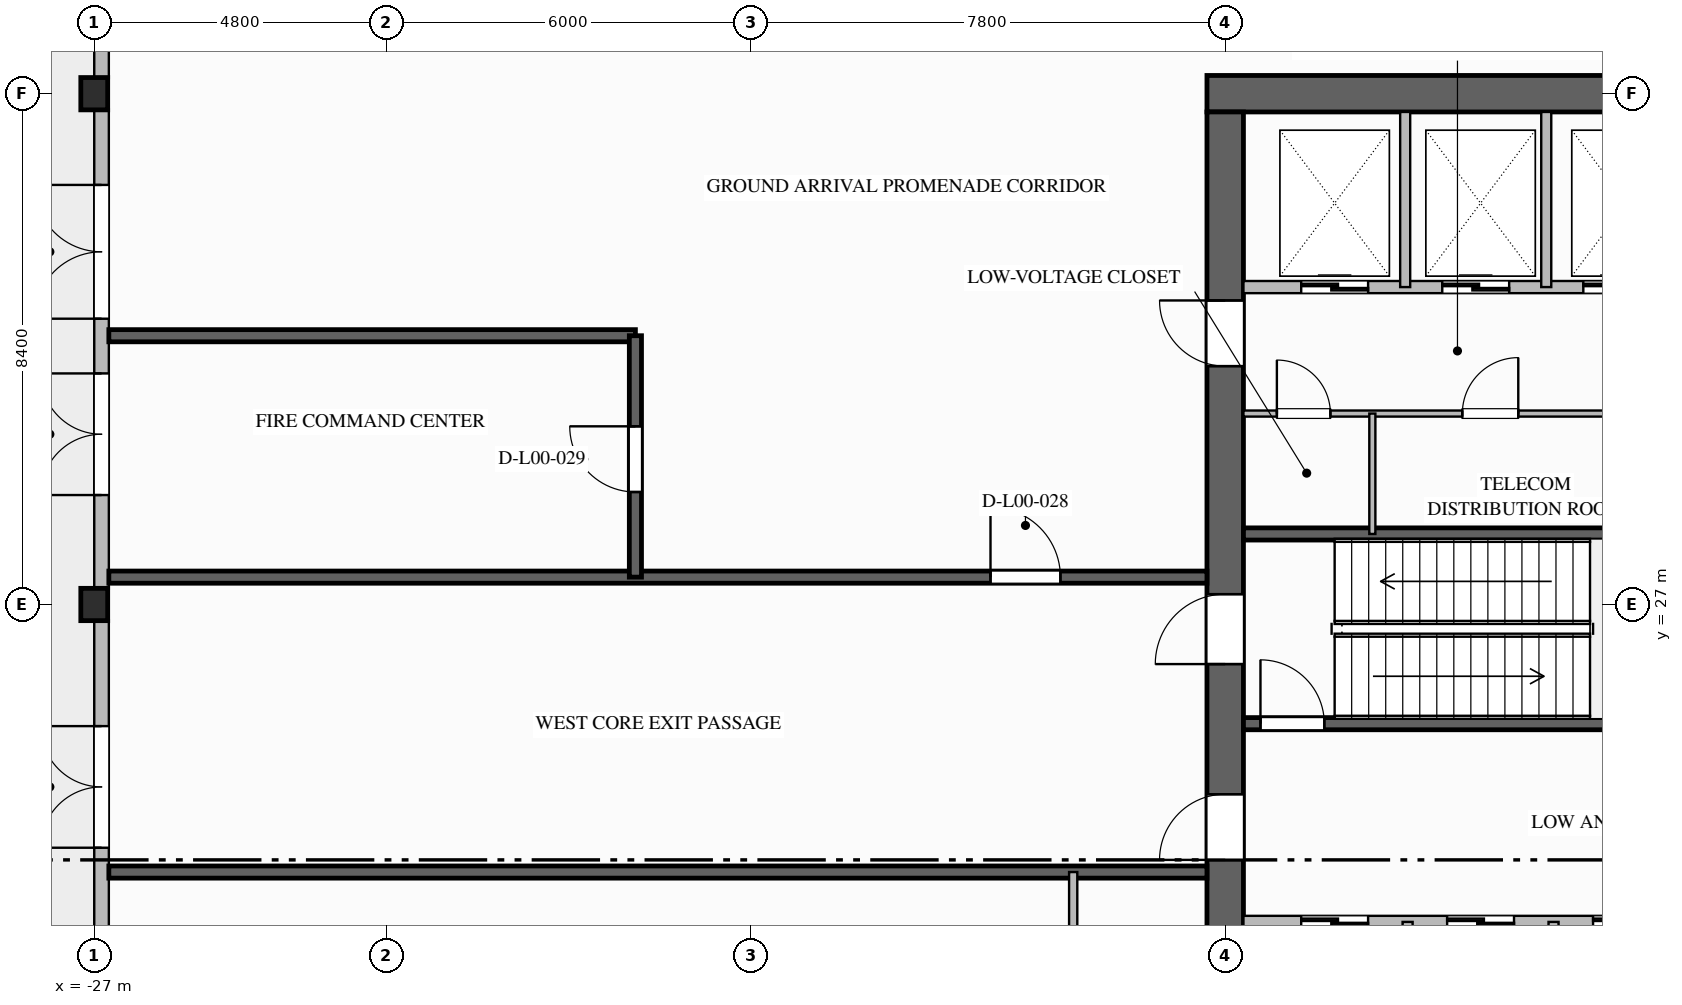
"""IFC4 building model, lengths in metres.
Left out: names, types, materials, properties, quantities, classifications, styles, units other than length and angle.
Written with IfcOpenShell. Run it as: python <this file> out.ifc"""

import sys

from ifc_helpers import new_model, si_unit, direction, frame, frame_2d, origin, origin_2d, place, context, subcontext, project, spatial, rectangle, i_section, extrude, element, fill, save


model = new_model("IFC4")
c1 = context("Model", 3, precision=1e-05, world=origin(), true_north=direction((0.0, 1.0)))
c2 = subcontext(c1, "Body", "Model", "MODEL_VIEW")
j1 = project(units=[si_unit("LENGTHUNIT", "METRE"), si_unit("PLANEANGLEUNIT", "RADIAN")], contexts=[c1])
p1 = place(None, origin())
s1 = spatial("IfcSite", under=j1, at=p1, CompositionType="ELEMENT")
p2 = place(p1, origin())
s2 = spatial("IfcBuilding", under=s1, at=p2, CompositionType="ELEMENT")
p3 = place(p2, origin())
s3 = spatial("IfcBuildingStorey", under=s2, at=p3, CompositionType="ELEMENT", Elevation=0.0)
p4 = place(p3, frame((-8.7, 35.4, 0.0), z_axis=(0.0, 0.0, 1.0), x_axis=(1.0, 0.0, 0.0)))
e1 = element("IfcWall", 1, at=p4, inside=s3, PredefinedType="SHEAR", context=c2, shape_type="SweptSolid", body=[
    extrude(rectangle(XDim=17.4, YDim=0.6, at=frame_2d((8.7, 0.0))), origin(), (0.0, 0.0, 1.0), 5.6),
])
p5 = place(p3, frame((-8.4, 18.9, 0.0), z_axis=(0.0, 0.0, 1.0), x_axis=(0.0, 1.0, 0.0)))
e2 = element("IfcWall", 2, at=p5, inside=s3, PredefinedType="SHEAR", context=c2, shape_type="SweptSolid", body=[
    extrude(rectangle(XDim=16.2, YDim=0.6, at=frame_2d((8.1, 0.0))), origin(), (0.0, 0.0, 1.0), 5.6),
])
p6 = place(p5, frame((7.12, 0.0, 0.0)))
e3 = element("IfcOpeningElement", 3, at=p6, cuts=e2, PredefinedType="OPENING", context=c2, shape_type="SweptSolid", body=[
    extrude(rectangle(XDim=1.15, YDim=2.15, at=frame_2d((0.575, 1.075))), frame((0.0, 0.31, 0.0), z_axis=(0.0, -1.0, 0.0), x_axis=(1.0, 0.0, 0.0)), (0.0, 0.0, 1.0), 0.62),
])
p7 = place(p5, frame((12.02, 0.0, 0.0)))
e4 = element("IfcOpeningElement", 4, at=p7, cuts=e2, PredefinedType="OPENING", context=c2, shape_type="SweptSolid", body=[
    extrude(rectangle(XDim=1.08, YDim=2.04, at=frame_2d((0.54, 1.02))), frame((0.0, 0.31, 0.0), z_axis=(0.0, -1.0, 0.0), x_axis=(1.0, 0.0, 0.0)), (0.0, 0.0, 1.0), 0.62),
])
p8 = place(p5, frame((3.9, 0.0, 0.0)))
e5 = element("IfcOpeningElement", 5, at=p8, cuts=e2, PredefinedType="OPENING", context=c2, shape_type="SweptSolid", body=[
    extrude(rectangle(XDim=1.08, YDim=2.04, at=frame_2d((0.54, 1.02))), frame((0.0, 0.31, 0.0), z_axis=(0.0, -1.0, 0.0), x_axis=(1.0, 0.0, 0.0)), (0.0, 0.0, 1.0), 0.62),
])
for number, where, z_axis, x_axis in (
    (6, (-27.0, 27.0, 0.0), (0.0, 0.0, 1.0), (1.0, 0.0, 0.0)),
    (7, (-27.0, 35.4, 0.0), (0.0, 0.0, 1.0), (1.0, 0.0, 0.0)),
):
    element("IfcColumn", number, at=place(p3, frame(where, z_axis=z_axis, x_axis=x_axis)), inside=s3, PredefinedType="COLUMN", context=c2, shape_type="SweptSolid", body=[
        extrude(i_section(OverallWidth=0.442, OverallDepth=0.531, WebThickness=0.066, FlangeThickness=0.106, FilletRadius=0.03, at=origin_2d()), origin(), (0.0, 0.0, 1.0), 5.6),
    ])
p9 = place(p3, frame((-26.88, 18.858, 0.0), z_axis=(0.0, 0.0, 1.0), x_axis=(0.0, 1.0, 0.0)))
e8 = element("IfcWall", 8, at=p9, inside=s3, PredefinedType="STANDARD", context=c2, shape_type="SweptSolid", body=[
    extrude(rectangle(XDim=7.885, YDim=0.24, at=frame_2d((3.942, 0.0))), origin(), (0.0, 0.0, 1.0), 4.604),
])
p10 = place(p9, frame((4.142, 0.0, 0.0)))
e9 = element("IfcOpeningElement", 9, at=p10, cuts=e8, PredefinedType="OPENING", context=c2, shape_type="SweptSolid", body=[
    extrude(rectangle(XDim=2.0, YDim=2.4, at=frame_2d((1.0, 1.2))), frame((0.0, 0.13, 0.0), z_axis=(0.0, -1.0, 0.0), x_axis=(1.0, 0.0, 0.0)), (0.0, 0.0, 1.0), 0.26),
])
p11 = place(p3, frame((-26.88, 27.258, 0.0), z_axis=(0.0, 0.0, 1.0), x_axis=(0.0, 1.0, 0.0)))
e10 = element("IfcWall", 10, at=p11, inside=s3, PredefinedType="STANDARD", context=c2, shape_type="SweptSolid", body=[
    extrude(rectangle(XDim=7.885, YDim=0.24, at=frame_2d((3.942, 0.0))), origin(), (0.0, 0.0, 1.0), 4.604),
])
p12 = place(p11, frame((1.542, 0.0, 0.0)))
e11 = element("IfcOpeningElement", 11, at=p12, cuts=e10, PredefinedType="OPENING", context=c2, shape_type="SweptSolid", body=[
    extrude(rectangle(XDim=2.0, YDim=2.4, at=frame_2d((1.0, 1.2))), frame((0.0, 0.13, 0.0), z_axis=(0.0, -1.0, 0.0), x_axis=(1.0, 0.0, 0.0)), (0.0, 0.0, 1.0), 0.26),
])
p13 = place(p11, frame((4.442, 0.0, 0.0)))
e12 = element("IfcOpeningElement", 12, at=p13, cuts=e10, PredefinedType="OPENING", context=c2, shape_type="SweptSolid", body=[
    extrude(rectangle(XDim=2.2, YDim=2.6, at=frame_2d((1.1, 1.3))), frame((0.0, 0.13, 0.0), z_axis=(0.0, -1.0, 0.0), x_axis=(1.0, 0.0, 0.0)), (0.0, 0.0, 1.0), 0.26),
])
p14 = place(p3, frame((-26.88, 35.658, 0.0), z_axis=(0.0, 0.0, 1.0), x_axis=(0.0, 1.0, 0.0)))
e13 = element("IfcWall", 13, at=p14, inside=s3, PredefinedType="STANDARD", context=c2, shape_type="SweptSolid", body=[
    extrude(rectangle(XDim=7.285, YDim=0.24, at=frame_2d((3.642, 0.0))), origin(), (0.0, 0.0, 1.0), 4.604),
])
p15 = place(p14, frame((2.442, 0.0, 0.9)))
e14 = element("IfcOpeningElement", 14, at=p15, cuts=e13, PredefinedType="OPENING", context=c2, shape_type="SweptSolid", body=[
    extrude(rectangle(XDim=2.4, YDim=2.6, at=frame_2d((1.2, 1.3))), frame((0.0, 0.13, 0.0), z_axis=(0.0, -1.0, 0.0), x_axis=(1.0, 0.0, 0.0)), (0.0, 0.0, 1.0), 0.26),
])
p16 = place(p3, frame((-8.1, 25.04, 0.0), z_axis=(0.0, 0.0, 1.0), x_axis=(1.0, 0.0, 0.0)))
e15 = element("IfcWall", 15, at=p16, inside=s3, PredefinedType="SOLIDWALL", context=c2, shape_type="SweptSolid", body=[
    extrude(rectangle(XDim=8.1, YDim=0.2, at=frame_2d((4.05, 0.0))), origin(), (0.0, 0.0, 1.0), 5.3),
])
p17 = place(p16, frame((0.28, 0.0, 0.0)))
e16 = element("IfcOpeningElement", 16, at=p17, cuts=e15, PredefinedType="OPENING", context=c2, shape_type="SweptSolid", body=[
    extrude(rectangle(XDim=1.05, YDim=2.1, at=frame_2d((0.525, 1.05))), frame((0.0, 0.11, 0.0), z_axis=(0.0, -1.0, 0.0), x_axis=(1.0, 0.0, 0.0)), (0.0, 0.0, 1.0), 0.22),
])
p18 = place(p3, frame((-8.1, 28.16, 0.0), z_axis=(0.0, 0.0, 1.0), x_axis=(1.0, 0.0, 0.0)))
e17 = element("IfcWall", 17, at=p18, inside=s3, PredefinedType="SOLIDWALL", context=c2, shape_type="SweptSolid", body=[
    extrude(rectangle(XDim=8.1, YDim=0.2, at=frame_2d((4.05, 0.0))), origin(), (0.0, 0.0, 1.0), 5.3),
])
p19 = place(p3, frame((-8.1, 32.22, 0.0), z_axis=(0.0, 0.0, 1.0), x_axis=(1.0, 0.0, 0.0)))
e18 = element("IfcWall", 18, at=p19, inside=s3, PredefinedType="SOLIDWALL", context=c2, shape_type="SweptSolid", body=[
    extrude(rectangle(XDim=7.1, YDim=0.2, at=frame_2d((3.55, 0.0))), origin(), (0.0, 0.0, 1.0), 5.3),
])
p20 = place(p19, frame((0.95, 0.0, 0.0)))
e19 = element("IfcOpeningElement", 19, at=p20, cuts=e18, PredefinedType="OPENING", context=c2, shape_type="SweptSolid", body=[
    extrude(rectangle(XDim=1.1, YDim=2.2, at=frame_2d((0.55, 1.1))), frame((0.0, 0.11, 0.0), z_axis=(0.0, -1.0, 0.0), x_axis=(1.0, 0.0, 0.0)), (0.0, 0.0, 1.0), 0.22),
])
p21 = place(p19, frame((3.27, 0.0, 0.0)))
e20 = element("IfcOpeningElement", 20, at=p21, cuts=e18, PredefinedType="OPENING", context=c2, shape_type="SweptSolid", body=[
    extrude(rectangle(XDim=1.1, YDim=2.2, at=frame_2d((0.55, 1.1))), frame((0.0, 0.11, 0.0), z_axis=(0.0, -1.0, 0.0), x_axis=(1.0, 0.0, 0.0)), (0.0, 0.0, 1.0), 0.22),
])
p22 = place(p19, frame((5.59, 0.0, 0.0)))
e21 = element("IfcOpeningElement", 21, at=p22, cuts=e18, PredefinedType="OPENING", context=c2, shape_type="SweptSolid", body=[
    extrude(rectangle(XDim=1.1, YDim=2.2, at=frame_2d((0.55, 1.1))), frame((0.0, 0.11, 0.0), z_axis=(0.0, -1.0, 0.0), x_axis=(1.0, 0.0, 0.0)), (0.0, 0.0, 1.0), 0.22),
])
for number, where, z_axis, x_axis in (
    (22, (-5.44, 32.22, 0.0), (0.0, 0.0, 1.0), (0.0, 1.0, 0.0)),
    (23, (-3.12, 32.22, 0.0), (0.0, 0.0, 1.0), (0.0, 1.0, 0.0)),
):
    element("IfcWall", number, at=place(p3, frame(where, z_axis=z_axis, x_axis=x_axis)), inside=s3, PredefinedType="PARTITIONING", context=c2, shape_type="SweptSolid", body=[
        extrude(rectangle(XDim=2.88, YDim=0.165, at=frame_2d((1.44, 0.0))), origin(), (0.0, 0.0, 1.0), 5.3),
    ])
p23 = place(p3, frame((-8.1, 30.14, 0.0), z_axis=(0.0, 0.0, 1.0), x_axis=(1.0, 0.0, 0.0)))
e24 = element("IfcWall", 24, at=p23, inside=s3, PredefinedType="PARTITIONING", context=c2, shape_type="SweptSolid", body=[
    extrude(rectangle(XDim=7.1, YDim=0.1, at=frame_2d((3.55, 0.0))), origin(), (0.0, 0.0, 1.0), 5.3),
])
p24 = place(p23, frame((0.55, 0.0, 0.0)))
e25 = element("IfcOpeningElement", 25, at=p24, cuts=e24, PredefinedType="OPENING", context=c2, shape_type="SweptSolid", body=[
    extrude(rectangle(XDim=0.88, YDim=2.1, at=frame_2d((0.44, 1.05))), frame((0.0, 0.06, 0.0), z_axis=(0.0, -1.0, 0.0), x_axis=(1.0, 0.0, 0.0)), (0.0, 0.0, 1.0), 0.12),
])
p25 = place(p23, frame((3.6, 0.0, 0.0)))
e26 = element("IfcOpeningElement", 26, at=p25, cuts=e24, PredefinedType="OPENING", context=c2, shape_type="SweptSolid", body=[
    extrude(rectangle(XDim=0.92, YDim=2.1, at=frame_2d((0.46, 1.05))), frame((0.0, 0.06, 0.0), z_axis=(0.0, -1.0, 0.0), x_axis=(1.0, 0.0, 0.0)), (0.0, 0.0, 1.0), 0.12),
])
p26 = place(p3, frame((-5.98, 28.16, 0.0), z_axis=(0.0, 0.0, 1.0), x_axis=(0.0, 1.0, 0.0)))
e27 = element("IfcWall", 27, at=p26, inside=s3, PredefinedType="PARTITIONING", context=c2, shape_type="SweptSolid", body=[
    extrude(rectangle(XDim=1.98, YDim=0.1, at=frame_2d((0.99, 0.0))), origin(), (0.0, 0.0, 1.0), 5.3),
])
p27 = place(p3, frame((-0.55, 21.78, 0.0), z_axis=(0.0, 0.0, 1.0), x_axis=(-1.0, 0.0, 0.0)))
e28 = element("IfcWall", 28, at=p27, inside=s3, PredefinedType="SOLIDWALL", context=c2, shape_type="SweptSolid", body=[
    extrude(rectangle(XDim=7.55, YDim=0.2, at=frame_2d((3.775, 0.0))), origin(), (0.0, 0.0, 1.0), 5.3),
])
p28 = place(p27, frame((5.5, 0.0, 0.0)))
e29 = element("IfcOpeningElement", 29, at=p28, cuts=e28, PredefinedType="OPENING", context=c2, shape_type="SweptSolid", body=[
    extrude(rectangle(XDim=1.1, YDim=2.2, at=frame_2d((0.55, 1.1))), frame((0.0, 0.11, 0.0), z_axis=(0.0, -1.0, 0.0), x_axis=(1.0, 0.0, 0.0)), (0.0, 0.0, 1.0), 0.22),
])
p29 = place(p27, frame((3.1, 0.0, 0.0)))
e30 = element("IfcOpeningElement", 30, at=p29, cuts=e28, PredefinedType="OPENING", context=c2, shape_type="SweptSolid", body=[
    extrude(rectangle(XDim=1.1, YDim=2.2, at=frame_2d((0.55, 1.1))), frame((0.0, 0.11, 0.0), z_axis=(0.0, -1.0, 0.0), x_axis=(1.0, 0.0, 0.0)), (0.0, 0.0, 1.0), 0.22),
])
p30 = place(p27, frame((0.7, 0.0, 0.0)))
e31 = element("IfcOpeningElement", 31, at=p30, cuts=e28, PredefinedType="OPENING", context=c2, shape_type="SweptSolid", body=[
    extrude(rectangle(XDim=1.1, YDim=2.2, at=frame_2d((0.55, 1.1))), frame((0.0, 0.11, 0.0), z_axis=(0.0, -1.0, 0.0), x_axis=(1.0, 0.0, 0.0)), (0.0, 0.0, 1.0), 0.22),
])
for number, where, z_axis, x_axis in (
    (32, (-5.4, 18.9, 0.0), (0.0, 0.0, 1.0), (0.0, 1.0, 0.0)),
    (33, (-3.0, 18.9, 0.0), (0.0, 0.0, 1.0), (0.0, 1.0, 0.0)),
):
    element("IfcWall", number, at=place(p3, frame(where, z_axis=z_axis, x_axis=x_axis)), inside=s3, PredefinedType="PARTITIONING", context=c2, shape_type="SweptSolid", body=[
        extrude(rectangle(XDim=2.88, YDim=0.165, at=frame_2d((1.44, 0.0))), origin(), (0.0, 0.0, 1.0), 5.3),
    ])
p31 = place(p3, frame((-26.76, 22.6, 0.0), z_axis=(0.0, 0.0, 1.0), x_axis=(1.0, 0.0, 0.0)))
e34 = element("IfcWall", 34, at=p31, inside=s3, PredefinedType="SOLIDWALL", context=c2, shape_type="SweptSolid", body=[
    extrude(rectangle(XDim=18.06, YDim=0.2, at=frame_2d((9.03, 0.0))), origin(), (0.0, 0.0, 1.0), 5.3),
])
p32 = place(p3, frame((-26.76, 27.45, 0.0), z_axis=(0.0, 0.0, 1.0), x_axis=(1.0, 0.0, 0.0)))
e35 = element("IfcWall", 35, at=p32, inside=s3, PredefinedType="SOLIDWALL", context=c2, shape_type="SweptSolid", body=[
    extrude(rectangle(XDim=18.06, YDim=0.2, at=frame_2d((9.03, 0.0))), origin(), (0.0, 0.0, 1.0), 5.3),
])
p33 = place(p32, frame((14.5, 0.0, 0.0)))
e36 = element("IfcOpeningElement", 36, at=p33, cuts=e35, PredefinedType="OPENING", context=c2, shape_type="SweptSolid", body=[
    extrude(rectangle(XDim=1.15, YDim=2.15, at=frame_2d((0.575, 1.075))), frame((0.0, 0.11, 0.0), z_axis=(0.0, -1.0, 0.0), x_axis=(1.0, 0.0, 0.0)), (0.0, 0.0, 1.0), 0.22),
])
p34 = place(p3, frame((-26.76, 31.42, 0.0), z_axis=(0.0, 0.0, 1.0), x_axis=(1.0, 0.0, 0.0)))
e37 = element("IfcWall", 37, at=p34, inside=s3, PredefinedType="SOLIDWALL", context=c2, shape_type="SweptSolid", body=[
    extrude(rectangle(XDim=8.66, YDim=0.2, at=frame_2d((4.33, 0.0))), origin(), (0.0, 0.0, 1.0), 5.3),
])
p35 = place(p3, frame((-18.1, 27.45, 0.0), z_axis=(0.0, 0.0, 1.0), x_axis=(0.0, 1.0, 0.0)))
e38 = element("IfcWall", 38, at=p35, inside=s3, PredefinedType="SOLIDWALL", context=c2, shape_type="SweptSolid", body=[
    extrude(rectangle(XDim=3.97, YDim=0.2, at=frame_2d((1.985, 0.0))), origin(), (0.0, 0.0, 1.0), 5.3),
])
p36 = place(p35, frame((1.4, 0.0, 0.0)))
e39 = element("IfcOpeningElement", 39, at=p36, cuts=e38, PredefinedType="OPENING", context=c2, shape_type="SweptSolid", body=[
    extrude(rectangle(XDim=1.08, YDim=2.04, at=frame_2d((0.54, 1.02))), frame((0.0, 0.11, 0.0), z_axis=(0.0, -1.0, 0.0), x_axis=(1.0, 0.0, 0.0)), (0.0, 0.0, 1.0), 0.22),
])
p37 = place(p3, frame((-10.9, 18.3, 0.0), z_axis=(0.0, 0.0, 1.0), x_axis=(0.0, 1.0, 0.0)))
e40 = element("IfcWall", 40, at=p37, inside=s3, PredefinedType="PARTITIONING", context=c2, shape_type="SweptSolid", body=[
    extrude(rectangle(XDim=4.3, YDim=0.135, at=frame_2d((2.15, 0.0))), origin(), (0.0, 0.0, 1.0), 5.3),
])
p38 = place(p37, frame((1.4, 0.0, 0.0)))
e41 = element("IfcOpeningElement", 41, at=p38, cuts=e40, PredefinedType="OPENING", context=c2, shape_type="SweptSolid", body=[
    extrude(rectangle(XDim=1.08, YDim=2.04, at=frame_2d((0.54, 1.02))), frame((0.0, 0.077, 0.0), z_axis=(0.0, -1.0, 0.0), x_axis=(1.0, 0.0, 0.0)), (0.0, 0.0, 1.0), 0.155),
])
p39 = place(p10, origin())
e42 = element("IfcDoor", 42, at=p39, inside=s3, OperationType="DOUBLE_DOOR_SINGLE_SWING", PredefinedType="DOOR", context=c2, shape_type="SweptSolid", body=[
    extrude(rectangle(XDim=2.0, YDim=2.4, at=frame_2d((1.0, 1.2))), frame((0.0, 0.025, 0.0), z_axis=(0.0, -1.0, 0.0), x_axis=(1.0, 0.0, 0.0)), (0.0, 0.0, 1.0), 0.05),
])
fill(e9, e42)
p40 = place(p12, origin())
e43 = element("IfcDoor", 43, at=p40, inside=s3, OperationType="DOUBLE_DOOR_SINGLE_SWING", PredefinedType="DOOR", context=c2, shape_type="SweptSolid", body=[
    extrude(rectangle(XDim=2.0, YDim=2.4, at=frame_2d((1.0, 1.2))), frame((0.0, 0.025, 0.0), z_axis=(0.0, -1.0, 0.0), x_axis=(1.0, 0.0, 0.0)), (0.0, 0.0, 1.0), 0.05),
])
fill(e11, e43)
p41 = place(p13, origin())
e44 = element("IfcDoor", 44, at=p41, inside=s3, OperationType="DOUBLE_DOOR_SINGLE_SWING", PredefinedType="DOOR", context=c2, shape_type="SweptSolid", body=[
    extrude(rectangle(XDim=2.2, YDim=2.6, at=frame_2d((1.1, 1.3))), frame((0.0, 0.025, 0.0), z_axis=(0.0, -1.0, 0.0), x_axis=(1.0, 0.0, 0.0)), (0.0, 0.0, 1.0), 0.05),
])
fill(e12, e44)
p42 = place(p17, origin())
e45 = element("IfcDoor", 45, at=p42, inside=s3, OperationType="SINGLE_SWING_LEFT", PredefinedType="DOOR", context=c2, shape_type="SweptSolid", body=[
    extrude(rectangle(XDim=1.05, YDim=2.1, at=frame_2d((0.525, 1.05))), frame((0.0, 0.025, 0.0), z_axis=(0.0, -1.0, 0.0), x_axis=(1.0, 0.0, 0.0)), (0.0, 0.0, 1.0), 0.05),
])
fill(e16, e45)
p43 = place(p6, origin())
e46 = element("IfcDoor", 46, at=p43, inside=s3, OperationType="SINGLE_SWING_LEFT", PredefinedType="DOOR", context=c2, shape_type="SweptSolid", body=[
    extrude(rectangle(XDim=1.15, YDim=2.15, at=frame_2d((0.575, 1.075))), frame((0.0, 0.025, 0.0), z_axis=(0.0, -1.0, 0.0), x_axis=(1.0, 0.0, 0.0)), (0.0, 0.0, 1.0), 0.05),
])
fill(e3, e46)
p44 = place(p20, origin())
e47 = element("IfcDoor", 47, at=p44, inside=s3, OperationType="SLIDING_TO_LEFT", PredefinedType="DOOR", context=c2, shape_type="SweptSolid", body=[
    extrude(rectangle(XDim=1.1, YDim=2.2, at=frame_2d((0.55, 1.1))), frame((0.0, 0.025, 0.0), z_axis=(0.0, -1.0, 0.0), x_axis=(1.0, 0.0, 0.0)), (0.0, 0.0, 1.0), 0.05),
])
fill(e19, e47)
p45 = place(p21, origin())
e48 = element("IfcDoor", 48, at=p45, inside=s3, OperationType="SLIDING_TO_LEFT", PredefinedType="DOOR", context=c2, shape_type="SweptSolid", body=[
    extrude(rectangle(XDim=1.1, YDim=2.2, at=frame_2d((0.55, 1.1))), frame((0.0, 0.025, 0.0), z_axis=(0.0, -1.0, 0.0), x_axis=(1.0, 0.0, 0.0)), (0.0, 0.0, 1.0), 0.05),
])
fill(e20, e48)
p46 = place(p22, origin())
e49 = element("IfcDoor", 49, at=p46, inside=s3, OperationType="SLIDING_TO_LEFT", PredefinedType="DOOR", context=c2, shape_type="SweptSolid", body=[
    extrude(rectangle(XDim=1.1, YDim=2.2, at=frame_2d((0.55, 1.1))), frame((0.0, 0.025, 0.0), z_axis=(0.0, -1.0, 0.0), x_axis=(1.0, 0.0, 0.0)), (0.0, 0.0, 1.0), 0.05),
])
fill(e21, e49)
p47 = place(p7, origin())
e50 = element("IfcDoor", 50, at=p47, inside=s3, OperationType="SINGLE_SWING_RIGHT", PredefinedType="DOOR", context=c2, shape_type="SweptSolid", body=[
    extrude(rectangle(XDim=1.08, YDim=2.04, at=frame_2d((0.54, 1.02))), frame((0.0, 0.025, 0.0), z_axis=(0.0, -1.0, 0.0), x_axis=(1.0, 0.0, 0.0)), (0.0, 0.0, 1.0), 0.05),
])
fill(e4, e50)
p48 = place(p24, origin())
e51 = element("IfcDoor", 51, at=p48, inside=s3, OperationType="SINGLE_SWING_LEFT", PredefinedType="DOOR", context=c2, shape_type="SweptSolid", body=[
    extrude(rectangle(XDim=0.88, YDim=2.1, at=frame_2d((0.44, 1.05))), frame((0.0, 0.025, 0.0), z_axis=(0.0, -1.0, 0.0), x_axis=(1.0, 0.0, 0.0)), (0.0, 0.0, 1.0), 0.05),
])
fill(e25, e51)
p49 = place(p25, origin())
e52 = element("IfcDoor", 52, at=p49, inside=s3, OperationType="SINGLE_SWING_RIGHT", PredefinedType="DOOR", context=c2, shape_type="SweptSolid", body=[
    extrude(rectangle(XDim=0.92, YDim=2.1, at=frame_2d((0.46, 1.05))), frame((0.0, 0.025, 0.0), z_axis=(0.0, -1.0, 0.0), x_axis=(1.0, 0.0, 0.0)), (0.0, 0.0, 1.0), 0.05),
])
fill(e26, e52)
p50 = place(p28, origin())
e53 = element("IfcDoor", 53, at=p50, inside=s3, OperationType="SLIDING_TO_LEFT", PredefinedType="DOOR", context=c2, shape_type="SweptSolid", body=[
    extrude(rectangle(XDim=1.1, YDim=2.2, at=frame_2d((0.55, 1.1))), frame((0.0, 0.025, 0.0), z_axis=(0.0, -1.0, 0.0), x_axis=(1.0, 0.0, 0.0)), (0.0, 0.0, 1.0), 0.05),
])
fill(e29, e53)
p51 = place(p29, origin())
e54 = element("IfcDoor", 54, at=p51, inside=s3, OperationType="SLIDING_TO_LEFT", PredefinedType="DOOR", context=c2, shape_type="SweptSolid", body=[
    extrude(rectangle(XDim=1.1, YDim=2.2, at=frame_2d((0.55, 1.1))), frame((0.0, 0.025, 0.0), z_axis=(0.0, -1.0, 0.0), x_axis=(1.0, 0.0, 0.0)), (0.0, 0.0, 1.0), 0.05),
])
fill(e30, e54)
p52 = place(p30, origin())
e55 = element("IfcDoor", 55, at=p52, inside=s3, OperationType="SLIDING_TO_LEFT", PredefinedType="DOOR", context=c2, shape_type="SweptSolid", body=[
    extrude(rectangle(XDim=1.1, YDim=2.2, at=frame_2d((0.55, 1.1))), frame((0.0, 0.025, 0.0), z_axis=(0.0, -1.0, 0.0), x_axis=(1.0, 0.0, 0.0)), (0.0, 0.0, 1.0), 0.05),
])
fill(e31, e55)
p53 = place(p8, origin())
e56 = element("IfcDoor", 56, at=p53, inside=s3, OperationType="SINGLE_SWING_LEFT", PredefinedType="DOOR", context=c2, shape_type="SweptSolid", body=[
    extrude(rectangle(XDim=1.08, YDim=2.04, at=frame_2d((0.54, 1.02))), frame((0.0, 0.025, 0.0), z_axis=(0.0, -1.0, 0.0), x_axis=(1.0, 0.0, 0.0)), (0.0, 0.0, 1.0), 0.05),
])
fill(e5, e56)
p54 = place(p33, origin())
e57 = element("IfcDoor", 57, at=p54, inside=s3, OperationType="SINGLE_SWING_LEFT", PredefinedType="DOOR", context=c2, shape_type="SweptSolid", body=[
    extrude(rectangle(XDim=1.15, YDim=2.15, at=frame_2d((0.575, 1.075))), frame((0.0, 0.025, 0.0), z_axis=(0.0, -1.0, 0.0), x_axis=(1.0, 0.0, 0.0)), (0.0, 0.0, 1.0), 0.05),
])
fill(e36, e57)
p55 = place(p36, origin())
e58 = element("IfcDoor", 58, at=p55, inside=s3, OperationType="SINGLE_SWING_RIGHT", PredefinedType="DOOR", context=c2, shape_type="SweptSolid", body=[
    extrude(rectangle(XDim=1.08, YDim=2.04, at=frame_2d((0.54, 1.02))), frame((0.0, 0.025, 0.0), z_axis=(0.0, -1.0, 0.0), x_axis=(1.0, 0.0, 0.0)), (0.0, 0.0, 1.0), 0.05),
])
fill(e39, e58)
save(model, sys.argv[1])
